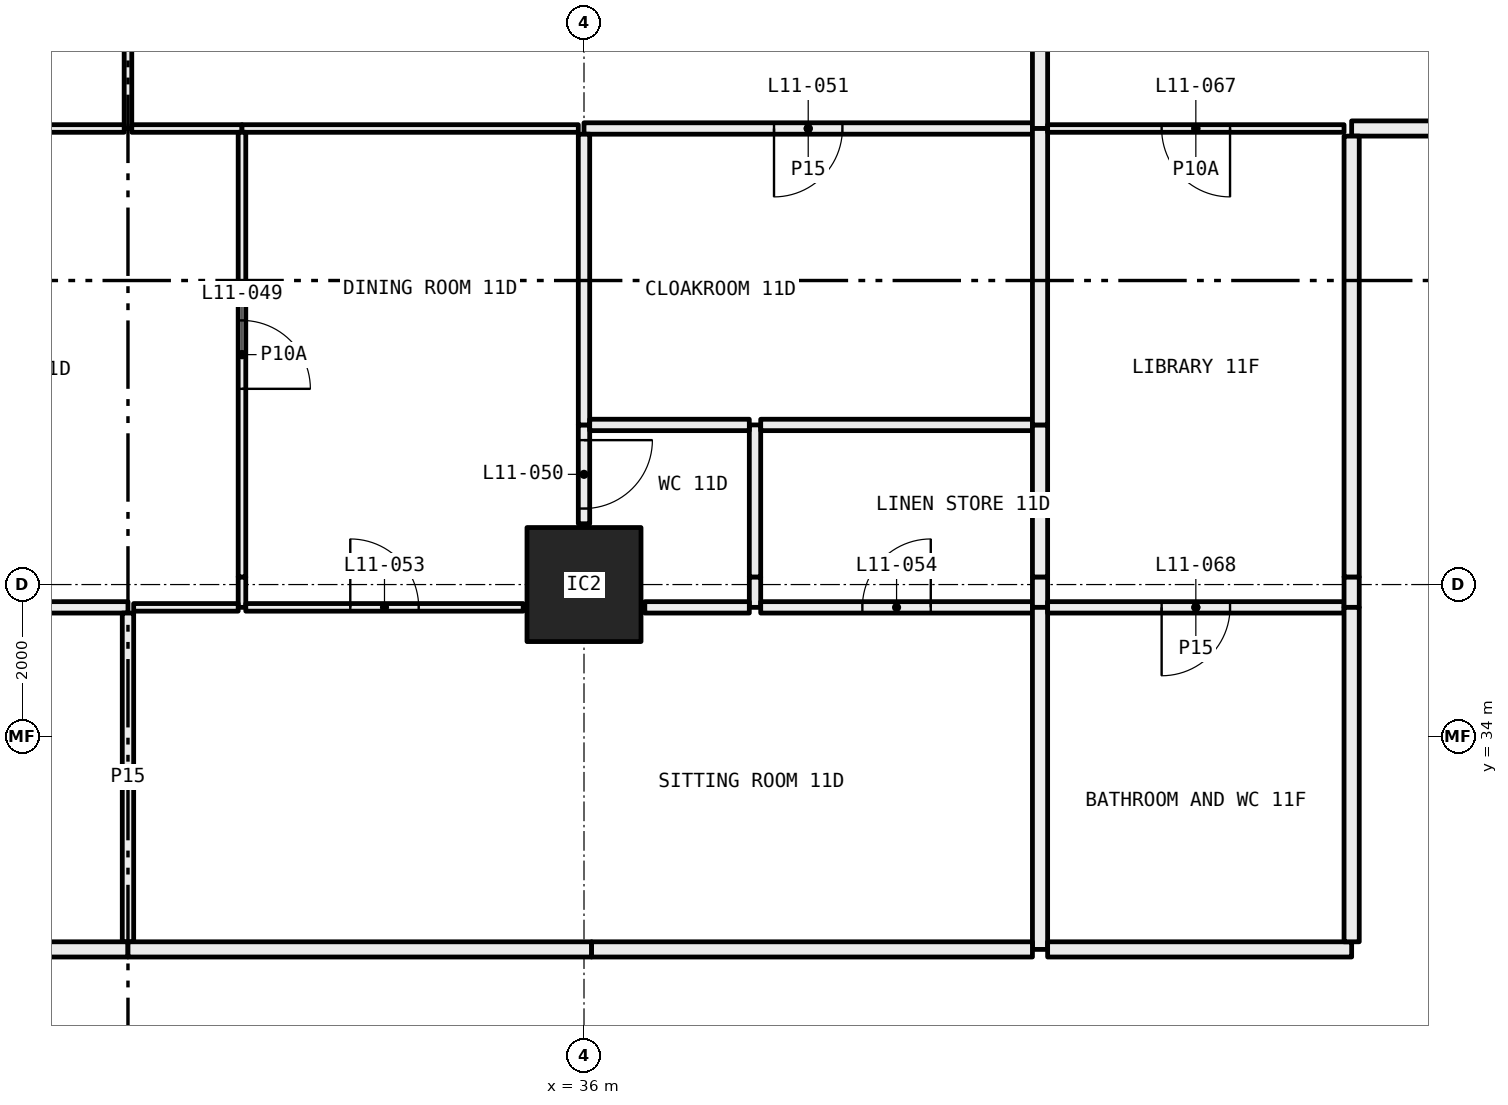
"""IFC4 building model, lengths in metres.
Left out: names, types, materials, properties, quantities, classifications, styles, units other than length and angle.
Written with IfcOpenShell. Run it as: python <this file> out.ifc"""

import sys

from ifc_helpers import new_model, si_unit, direction, frame, frame_2d, origin, origin_2d, place, context, subcontext, project, spatial, rectangle, hollow_rectangle, extrude, element, fill, save


model = new_model("IFC4")
c1 = context("Model", 3, precision=1e-05, world=origin(), true_north=direction((0.0, 1.0)))
c2 = subcontext(c1, "Body", "Model", "MODEL_VIEW")
j1 = project(units=[si_unit("LENGTHUNIT", "METRE"), si_unit("PLANEANGLEUNIT", "RADIAN")], contexts=[c1])
p1 = place(None, origin())
s1 = spatial("IfcSite", under=j1, at=p1, CompositionType="ELEMENT")
p2 = place(p1, origin())
s2 = spatial("IfcBuilding", under=s1, at=p2, CompositionType="ELEMENT")
p3 = place(p2, frame((0.0, 0.0, 50.7)))
s3 = spatial("IfcBuildingStorey", under=s2, at=p3, CompositionType="ELEMENT", Elevation=50.7)
p4 = place(p3, frame((36.0, 36.0, 0.0), z_axis=(0.0, 0.0, 1.0), x_axis=(1.0, 0.0, 0.0)))
e1 = element("IfcColumn", 1, at=p4, inside=s3, PredefinedType="COLUMN", context=c2, shape_type="SweptSolid", body=[
    extrude(hollow_rectangle(XDim=1.5, YDim=1.5, WallThickness=0.065, at=origin_2d()), origin(), (0.0, 0.0, 1.0), 3.05),
])
p5 = place(p3, frame((30.0, 42.0, 0.0), z_axis=(0.0, 0.0, 1.0), x_axis=(0.0, 1.0, 0.0)))
e2 = element("IfcWall", 2, at=p5, inside=s3, PredefinedType="PARTITIONING", context=c2, shape_type="SweptSolid", body=[
    extrude(rectangle(XDim=5.28, YDim=0.1, at=frame_2d((2.64, 0.0))), origin(), (0.0, 0.0, 1.0), 3.05),
])
p6 = place(p5, frame((2.19, 0.0, 0.0)))
e3 = element("IfcOpeningElement", 3, at=p6, cuts=e2, PredefinedType="OPENING", context=c2, shape_type="SweptSolid", body=[
    extrude(rectangle(XDim=0.9, YDim=2.1, at=frame_2d((0.45, 1.05))), frame((0.0, 0.06, 0.0), z_axis=(0.0, -1.0, 0.0), x_axis=(1.0, 0.0, 0.0)), (0.0, 0.0, 1.0), 0.12),
])
p7 = place(p3, frame((26.0, 42.0, 0.0), z_axis=(0.0, 0.0, 1.0), x_axis=(1.0, 0.0, 0.0)))
e4 = element("IfcWall", 4, at=p7, inside=s3, PredefinedType="PARTITIONING", context=c2, shape_type="SweptSolid", body=[
    extrude(rectangle(XDim=3.95, YDim=0.1, at=frame_2d((1.975, 0.0))), origin(), (0.0, 0.0, 1.0), 3.05),
])
p8 = place(p7, frame((1.525, 0.0, 0.0)))
e5 = element("IfcOpeningElement", 5, at=p8, cuts=e4, PredefinedType="OPENING", context=c2, shape_type="SweptSolid", body=[
    extrude(rectangle(XDim=0.9, YDim=2.1, at=frame_2d((0.45, 1.05))), frame((0.0, 0.06, 0.0), z_axis=(0.0, -1.0, 0.0), x_axis=(1.0, 0.0, 0.0)), (0.0, 0.0, 1.0), 0.12),
])
p9 = place(p3, frame((30.05, 42.0, 0.0), z_axis=(0.0, 0.0, 1.0), x_axis=(1.0, 0.0, 0.0)))
e6 = element("IfcWall", 6, at=p9, inside=s3, PredefinedType="PARTITIONING", context=c2, shape_type="SweptSolid", body=[
    extrude(rectangle(XDim=1.45, YDim=0.1, at=frame_2d((0.725, 0.0))), origin(), (0.0, 0.0, 1.0), 3.05),
])
p10 = place(p3, frame((31.5, 42.0, 0.0), z_axis=(0.0, 0.0, 1.0), x_axis=(1.0, 0.0, 0.0)))
e7 = element("IfcWall", 7, at=p10, inside=s3, PredefinedType="PARTITIONING", context=c2, shape_type="SweptSolid", body=[
    extrude(rectangle(XDim=4.425, YDim=0.1, at=frame_2d((2.212, 0.0))), origin(), (0.0, 0.0, 1.0), 2.45),
])
p11 = place(p3, frame((36.0, 42.0, 0.0), z_axis=(0.0, 0.0, 1.0), x_axis=(1.0, 0.0, 0.0)))
e8 = element("IfcWall", 8, at=p11, inside=s3, PredefinedType="PARTITIONING", context=c2, shape_type="SweptSolid", body=[
    extrude(rectangle(XDim=5.9, YDim=0.15, at=frame_2d((2.95, 0.0))), origin(), (0.0, 0.0, 1.0), 2.45),
])
p12 = place(p11, frame((2.5, 0.0, 0.0)))
e9 = element("IfcOpeningElement", 9, at=p12, cuts=e8, PredefinedType="OPENING", context=c2, shape_type="SweptSolid", body=[
    extrude(rectangle(XDim=0.9, YDim=2.1, at=frame_2d((0.45, 1.05))), frame((0.0, 0.085, 0.0), z_axis=(0.0, -1.0, 0.0), x_axis=(1.0, 0.0, 0.0)), (0.0, 0.0, 1.0), 0.17),
])
p13 = place(p3, frame((42.0, 42.0, 0.0), z_axis=(0.0, 0.0, 1.0), x_axis=(0.0, 1.0, 0.0)))
e10 = element("IfcWall", 10, at=p13, inside=s3, PredefinedType="PARTITIONING", context=c2, shape_type="SweptSolid", body=[
    extrude(rectangle(XDim=5.28, YDim=0.2, at=frame_2d((2.64, 0.0))), origin(), (0.0, 0.0, 1.0), 3.05),
])
p14 = place(p3, frame((31.5, 35.7, 0.0), z_axis=(0.0, 0.0, 1.0), x_axis=(0.0, 1.0, 0.0)))
e11 = element("IfcWall", 11, at=p14, inside=s3, PredefinedType="PARTITIONING", context=c2, shape_type="SweptSolid", body=[
    extrude(rectangle(XDim=0.4, YDim=0.1, at=frame_2d((0.2, 0.0))), origin(), (0.0, 0.0, 1.0), 2.45),
])
p15 = place(p3, frame((31.5, 36.1, 0.0), z_axis=(0.0, 0.0, 1.0), x_axis=(0.0, 1.0, 0.0)))
e12 = element("IfcWall", 12, at=p15, inside=s3, PredefinedType="PARTITIONING", context=c2, shape_type="SweptSolid", body=[
    extrude(rectangle(XDim=5.85, YDim=0.1, at=frame_2d((2.925, 0.0))), origin(), (0.0, 0.0, 1.0), 3.05),
])
p16 = place(p15, frame((2.475, 0.0, 0.0)))
e13 = element("IfcOpeningElement", 13, at=p16, cuts=e12, PredefinedType="OPENING", context=c2, shape_type="SweptSolid", body=[
    extrude(rectangle(XDim=0.9, YDim=2.1, at=frame_2d((0.45, 1.05))), frame((0.0, 0.06, 0.0), z_axis=(0.0, -1.0, 0.0), x_axis=(1.0, 0.0, 0.0)), (0.0, 0.0, 1.0), 0.12),
])
p17 = place(p3, frame((26.0, 35.7, 0.0), z_axis=(0.0, 0.0, 1.0), x_axis=(1.0, 0.0, 0.0)))
e14 = element("IfcWall", 14, at=p17, inside=s3, PredefinedType="PARTITIONING", context=c2, shape_type="SweptSolid", body=[
    extrude(rectangle(XDim=4.0, YDim=0.15, at=frame_2d((2.0, 0.0))), origin(), (0.0, 0.0, 1.0), 3.05),
])
p18 = place(p17, frame((1.55, 0.0, 0.0)))
e15 = element("IfcOpeningElement", 15, at=p18, cuts=e14, PredefinedType="OPENING", context=c2, shape_type="SweptSolid", body=[
    extrude(rectangle(XDim=0.9, YDim=2.1, at=frame_2d((0.45, 1.05))), frame((0.0, 0.085, 0.0), z_axis=(0.0, -1.0, 0.0), x_axis=(1.0, 0.0, 0.0)), (0.0, 0.0, 1.0), 0.17),
])
p19 = place(p3, frame((30.075, 35.7, 0.0), z_axis=(0.0, 0.0, 1.0), x_axis=(1.0, 0.0, 0.0)))
e16 = element("IfcWall", 16, at=p19, inside=s3, PredefinedType="PARTITIONING", context=c2, shape_type="SweptSolid", body=[
    extrude(rectangle(XDim=1.375, YDim=0.1, at=frame_2d((0.688, 0.0))), origin(), (0.0, 0.0, 1.0), 3.05),
])
p20 = place(p3, frame((36.0, 36.8, 0.0), z_axis=(0.0, 0.0, 1.0), x_axis=(0.0, 1.0, 0.0)))
e17 = element("IfcWall", 17, at=p20, inside=s3, PredefinedType="PARTITIONING", context=c2, shape_type="SweptSolid", body=[
    extrude(rectangle(XDim=1.3, YDim=0.15, at=frame_2d((0.65, 0.0))), origin(), (0.0, 0.0, 1.0), 2.45),
])
p21 = place(p20, frame((0.2, 0.0, 0.0)))
e18 = element("IfcOpeningElement", 18, at=p21, cuts=e17, PredefinedType="OPENING", context=c2, shape_type="SweptSolid", body=[
    extrude(rectangle(XDim=0.9, YDim=2.1, at=frame_2d((0.45, 1.05))), frame((0.0, 0.085, 0.0), z_axis=(0.0, -1.0, 0.0), x_axis=(1.0, 0.0, 0.0)), (0.0, 0.0, 1.0), 0.17),
])
p22 = place(p3, frame((36.0, 38.1, 0.0), z_axis=(0.0, 0.0, 1.0), x_axis=(0.0, 1.0, 0.0)))
e19 = element("IfcWall", 19, at=p22, inside=s3, PredefinedType="PARTITIONING", context=c2, shape_type="SweptSolid", body=[
    extrude(rectangle(XDim=3.825, YDim=0.15, at=frame_2d((1.913, 0.0))), origin(), (0.0, 0.0, 1.0), 2.45),
])
p23 = place(p3, frame((31.55, 35.7, 0.0), z_axis=(0.0, 0.0, 1.0), x_axis=(1.0, 0.0, 0.0)))
e20 = element("IfcWall", 20, at=p23, inside=s3, PredefinedType="PARTITIONING", context=c2, shape_type="SweptSolid", body=[
    extrude(rectangle(XDim=3.65, YDim=0.1, at=frame_2d((1.825, 0.0))), origin(), (0.0, 0.0, 1.0), 3.05),
])
p24 = place(p23, frame((1.375, 0.0, 0.0)))
e21 = element("IfcOpeningElement", 21, at=p24, cuts=e20, PredefinedType="OPENING", context=c2, shape_type="SweptSolid", body=[
    extrude(rectangle(XDim=0.9, YDim=2.1, at=frame_2d((0.45, 1.05))), frame((0.0, 0.06, 0.0), z_axis=(0.0, -1.0, 0.0), x_axis=(1.0, 0.0, 0.0)), (0.0, 0.0, 1.0), 0.12),
])
p25 = place(p3, frame((38.25, 35.7, 0.0), z_axis=(0.0, 0.0, 1.0), x_axis=(0.0, 1.0, 0.0)))
e22 = element("IfcWall", 22, at=p25, inside=s3, PredefinedType="PARTITIONING", context=c2, shape_type="SweptSolid", body=[
    extrude(rectangle(XDim=0.4, YDim=0.15, at=frame_2d((0.2, 0.0))), origin(), (0.0, 0.0, 1.0), 2.45),
])
p26 = place(p3, frame((38.25, 36.1, 0.0), z_axis=(0.0, 0.0, 1.0), x_axis=(0.0, 1.0, 0.0)))
e23 = element("IfcWall", 23, at=p26, inside=s3, PredefinedType="PARTITIONING", context=c2, shape_type="SweptSolid", body=[
    extrude(rectangle(XDim=2.0, YDim=0.15, at=frame_2d((1.0, 0.0))), origin(), (0.0, 0.0, 1.0), 3.05),
])
p27 = place(p3, frame((38.175, 38.1, 0.0), z_axis=(0.0, 0.0, 1.0), x_axis=(-1.0, 0.0, 0.0)))
e24 = element("IfcWall", 24, at=p27, inside=s3, PredefinedType="PARTITIONING", context=c2, shape_type="SweptSolid", body=[
    extrude(rectangle(XDim=2.1, YDim=0.15, at=frame_2d((1.05, 0.0))), origin(), (0.0, 0.0, 1.0), 2.45),
])
p28 = place(p3, frame((36.8, 35.7, 0.0), z_axis=(0.0, 0.0, 1.0), x_axis=(1.0, 0.0, 0.0)))
e25 = element("IfcWall", 25, at=p28, inside=s3, PredefinedType="PARTITIONING", context=c2, shape_type="SweptSolid", body=[
    extrude(rectangle(XDim=1.375, YDim=0.15, at=frame_2d((0.688, 0.0))), origin(), (0.0, 0.0, 1.0), 3.05),
])
p29 = place(p3, frame((41.9, 38.1, 0.0), z_axis=(0.0, 0.0, 1.0), x_axis=(-1.0, 0.0, 0.0)))
e26 = element("IfcWall", 26, at=p29, inside=s3, PredefinedType="PARTITIONING", context=c2, shape_type="SweptSolid", body=[
    extrude(rectangle(XDim=3.575, YDim=0.15, at=frame_2d((1.788, 0.0))), origin(), (0.0, 0.0, 1.0), 3.05),
])
p30 = place(p3, frame((38.325, 35.7, 0.0), z_axis=(0.0, 0.0, 1.0), x_axis=(1.0, 0.0, 0.0)))
e27 = element("IfcWall", 27, at=p30, inside=s3, PredefinedType="PARTITIONING", context=c2, shape_type="SweptSolid", body=[
    extrude(rectangle(XDim=3.575, YDim=0.15, at=frame_2d((1.788, 0.0))), origin(), (0.0, 0.0, 1.0), 3.05),
])
p31 = place(p30, frame((1.337, 0.0, 0.0)))
e28 = element("IfcOpeningElement", 28, at=p31, cuts=e27, PredefinedType="OPENING", context=c2, shape_type="SweptSolid", body=[
    extrude(rectangle(XDim=0.9, YDim=2.1, at=frame_2d((0.45, 1.05))), frame((0.0, 0.085, 0.0), z_axis=(0.0, -1.0, 0.0), x_axis=(1.0, 0.0, 0.0)), (0.0, 0.0, 1.0), 0.17),
])
p32 = place(p3, frame((42.0, 35.7, 0.0), z_axis=(0.0, 0.0, 1.0), x_axis=(0.0, 1.0, 0.0)))
e29 = element("IfcWall", 29, at=p32, inside=s3, PredefinedType="PARTITIONING", context=c2, shape_type="SweptSolid", body=[
    extrude(rectangle(XDim=0.4, YDim=0.2, at=frame_2d((0.2, 0.0))), origin(), (0.0, 0.0, 1.0), 2.45),
])
p33 = place(p3, frame((42.0, 36.1, 0.0), z_axis=(0.0, 0.0, 1.0), x_axis=(0.0, 1.0, 0.0)))
e30 = element("IfcWall", 30, at=p33, inside=s3, PredefinedType="PARTITIONING", context=c2, shape_type="SweptSolid", body=[
    extrude(rectangle(XDim=2.0, YDim=0.2, at=frame_2d((1.0, 0.0))), origin(), (0.0, 0.0, 1.0), 3.05),
])
p34 = place(p3, frame((42.0, 38.1, 0.0), z_axis=(0.0, 0.0, 1.0), x_axis=(0.0, 1.0, 0.0)))
e31 = element("IfcWall", 31, at=p34, inside=s3, PredefinedType="PARTITIONING", context=c2, shape_type="SweptSolid", body=[
    extrude(rectangle(XDim=3.9, YDim=0.2, at=frame_2d((1.95, 0.0))), origin(), (0.0, 0.0, 1.0), 3.05),
])
p35 = place(p3, frame((30.0, 31.3, 0.0), z_axis=(0.0, 0.0, 1.0), x_axis=(0.0, 1.0, 0.0)))
e32 = element("IfcWall", 32, at=p35, inside=s3, PredefinedType="PARTITIONING", context=c2, shape_type="SweptSolid", body=[
    extrude(rectangle(XDim=4.325, YDim=0.15, at=frame_2d((2.163, 0.0))), origin(), (0.0, 0.0, 1.0), 3.05),
])
p36 = place(p3, frame((26.0, 31.2, 0.0), z_axis=(0.0, 0.0, 1.0), x_axis=(1.0, 0.0, 0.0)))
e33 = element("IfcWall", 33, at=p36, inside=s3, PredefinedType="PARTITIONING", context=c2, shape_type="SweptSolid", body=[
    extrude(rectangle(XDim=4.0, YDim=0.2, at=frame_2d((2.0, 0.0))), origin(), (0.0, 0.0, 1.0), 3.05),
])
p37 = place(p3, frame((42.0, 31.2, 0.0), z_axis=(0.0, 0.0, 1.0), x_axis=(0.0, 1.0, 0.0)))
e34 = element("IfcWall", 34, at=p37, inside=s3, PredefinedType="PARTITIONING", context=c2, shape_type="SweptSolid", body=[
    extrude(rectangle(XDim=4.5, YDim=0.2, at=frame_2d((2.25, 0.0))), origin(), (0.0, 0.0, 1.0), 3.05),
])
p38 = place(p3, frame((30.0, 31.2, 0.0), z_axis=(0.0, 0.0, 1.0), x_axis=(1.0, 0.0, 0.0)))
e35 = element("IfcWall", 35, at=p38, inside=s3, PredefinedType="PARTITIONING", context=c2, shape_type="SweptSolid", body=[
    extrude(rectangle(XDim=6.1, YDim=0.2, at=frame_2d((3.05, 0.0))), origin(), (0.0, 0.0, 1.0), 2.45),
])
p39 = place(p3, frame((36.1, 31.2, 0.0), z_axis=(0.0, 0.0, 1.0), x_axis=(1.0, 0.0, 0.0)))
e36 = element("IfcWall", 36, at=p39, inside=s3, PredefinedType="PARTITIONING", context=c2, shape_type="SweptSolid", body=[
    extrude(rectangle(XDim=5.8, YDim=0.2, at=frame_2d((2.9, 0.0))), origin(), (0.0, 0.0, 1.0), 3.05),
])
p40 = place(p3, frame((42.1, 42.0, 0.0), z_axis=(0.0, 0.0, 1.0), x_axis=(1.0, 0.0, 0.0)))
e37 = element("IfcWall", 37, at=p40, inside=s3, PredefinedType="PARTITIONING", context=c2, shape_type="SweptSolid", body=[
    extrude(rectangle(XDim=3.9, YDim=0.1, at=frame_2d((1.95, 0.0))), origin(), (0.0, 0.0, 1.0), 3.05),
])
p41 = place(p40, frame((1.5, 0.0, 0.0)))
e38 = element("IfcOpeningElement", 38, at=p41, cuts=e37, PredefinedType="OPENING", context=c2, shape_type="SweptSolid", body=[
    extrude(rectangle(XDim=0.9, YDim=2.1, at=frame_2d((0.45, 1.05))), frame((0.0, 0.06, 0.0), z_axis=(0.0, -1.0, 0.0), x_axis=(1.0, 0.0, 0.0)), (0.0, 0.0, 1.0), 0.12),
])
p42 = place(p3, frame((46.1, 42.0, 0.0), z_axis=(0.0, 0.0, 1.0), x_axis=(1.0, 0.0, 0.0)))
e39 = element("IfcWall", 39, at=p42, inside=s3, PredefinedType="PARTITIONING", context=c2, shape_type="SweptSolid", body=[
    extrude(rectangle(XDim=1.9, YDim=0.2, at=frame_2d((0.95, 0.0))), origin(), (0.0, 0.0, 1.0), 3.05),
])
p43 = place(p3, frame((42.1, 35.7, 0.0), z_axis=(0.0, 0.0, 1.0), x_axis=(1.0, 0.0, 0.0)))
e40 = element("IfcWall", 40, at=p43, inside=s3, PredefinedType="PARTITIONING", context=c2, shape_type="SweptSolid", body=[
    extrude(rectangle(XDim=3.9, YDim=0.15, at=frame_2d((1.95, 0.0))), origin(), (0.0, 0.0, 1.0), 3.05),
])
p44 = place(p43, frame((1.5, 0.0, 0.0)))
e41 = element("IfcOpeningElement", 41, at=p44, cuts=e40, PredefinedType="OPENING", context=c2, shape_type="SweptSolid", body=[
    extrude(rectangle(XDim=0.9, YDim=2.1, at=frame_2d((0.45, 1.05))), frame((0.0, 0.085, 0.0), z_axis=(0.0, -1.0, 0.0), x_axis=(1.0, 0.0, 0.0)), (0.0, 0.0, 1.0), 0.17),
])
p45 = place(p3, frame((46.1, 35.7, 0.0), z_axis=(0.0, 0.0, 1.0), x_axis=(0.0, 1.0, 0.0)))
e42 = element("IfcWall", 42, at=p45, inside=s3, PredefinedType="PARTITIONING", context=c2, shape_type="SweptSolid", body=[
    extrude(rectangle(XDim=0.4, YDim=0.2, at=frame_2d((0.2, 0.0))), origin(), (0.0, 0.0, 1.0), 2.45),
])
p46 = place(p3, frame((46.1, 36.1, 0.0), z_axis=(0.0, 0.0, 1.0), x_axis=(0.0, 1.0, 0.0)))
e43 = element("IfcWall", 43, at=p46, inside=s3, PredefinedType="PARTITIONING", context=c2, shape_type="SweptSolid", body=[
    extrude(rectangle(XDim=5.8, YDim=0.2, at=frame_2d((2.9, 0.0))), origin(), (0.0, 0.0, 1.0), 3.05),
])
p47 = place(p3, frame((42.1, 31.2, 0.0), z_axis=(0.0, 0.0, 1.0), x_axis=(1.0, 0.0, 0.0)))
e44 = element("IfcWall", 44, at=p47, inside=s3, PredefinedType="PARTITIONING", context=c2, shape_type="SweptSolid", body=[
    extrude(rectangle(XDim=4.0, YDim=0.2, at=frame_2d((2.0, 0.0))), origin(), (0.0, 0.0, 1.0), 3.05),
])
p48 = place(p3, frame((46.1, 31.3, 0.0), z_axis=(0.0, 0.0, 1.0), x_axis=(0.0, 1.0, 0.0)))
e45 = element("IfcWall", 45, at=p48, inside=s3, PredefinedType="PARTITIONING", context=c2, shape_type="SweptSolid", body=[
    extrude(rectangle(XDim=4.4, YDim=0.2, at=frame_2d((2.2, 0.0))), origin(), (0.0, 0.0, 1.0), 3.05),
])
p49 = place(p16, frame((0.9, 0.0, 0.0), x_axis=(-1.0, 0.0, 0.0)))
e46 = element("IfcDoor", 46, at=p49, inside=s3, OperationType="SINGLE_SWING_LEFT", PredefinedType="DOOR", context=c2, shape_type="SweptSolid", body=[
    extrude(rectangle(XDim=0.9, YDim=2.1, at=frame_2d((0.45, 1.05))), frame((0.0, 0.025, 0.0), z_axis=(0.0, -1.0, 0.0), x_axis=(1.0, 0.0, 0.0)), (0.0, 0.0, 1.0), 0.05),
])
fill(e13, e46)
p50 = place(p21, frame((0.9, 0.0, 0.0), x_axis=(-1.0, 0.0, 0.0)))
e47 = element("IfcDoor", 47, at=p50, inside=s3, OperationType="SINGLE_SWING_RIGHT", PredefinedType="DOOR", context=c2, shape_type="SweptSolid", body=[
    extrude(rectangle(XDim=0.9, YDim=2.1, at=frame_2d((0.45, 1.05))), frame((0.0, 0.025, 0.0), z_axis=(0.0, -1.0, 0.0), x_axis=(1.0, 0.0, 0.0)), (0.0, 0.0, 1.0), 0.05),
])
fill(e18, e47)
p51 = place(p12, frame((0.9, 0.0, 0.0), x_axis=(-1.0, 0.0, 0.0)))
e48 = element("IfcDoor", 48, at=p51, inside=s3, OperationType="SINGLE_SWING_LEFT", PredefinedType="DOOR", context=c2, shape_type="SweptSolid", body=[
    extrude(rectangle(XDim=0.9, YDim=2.1, at=frame_2d((0.45, 1.05))), frame((0.0, 0.025, 0.0), z_axis=(0.0, -1.0, 0.0), x_axis=(1.0, 0.0, 0.0)), (0.0, 0.0, 1.0), 0.05),
])
fill(e9, e48)
p52 = place(p24, origin())
e49 = element("IfcDoor", 49, at=p52, inside=s3, OperationType="SINGLE_SWING_RIGHT", PredefinedType="DOOR", context=c2, shape_type="SweptSolid", body=[
    extrude(rectangle(XDim=0.9, YDim=2.1, at=frame_2d((0.45, 1.05))), frame((0.0, 0.025, 0.0), z_axis=(0.0, -1.0, 0.0), x_axis=(1.0, 0.0, 0.0)), (0.0, 0.0, 1.0), 0.05),
])
fill(e21, e49)
p53 = place(p31, origin())
e50 = element("IfcDoor", 50, at=p53, inside=s3, OperationType="SINGLE_SWING_LEFT", PredefinedType="DOOR", context=c2, shape_type="SweptSolid", body=[
    extrude(rectangle(XDim=0.9, YDim=2.1, at=frame_2d((0.45, 1.05))), frame((0.0, 0.025, 0.0), z_axis=(0.0, -1.0, 0.0), x_axis=(1.0, 0.0, 0.0)), (0.0, 0.0, 1.0), 0.05),
])
fill(e28, e50)
p54 = place(p41, frame((0.9, 0.0, 0.0), x_axis=(-1.0, 0.0, 0.0)))
e51 = element("IfcDoor", 51, at=p54, inside=s3, OperationType="SINGLE_SWING_RIGHT", PredefinedType="DOOR", context=c2, shape_type="SweptSolid", body=[
    extrude(rectangle(XDim=0.9, YDim=2.1, at=frame_2d((0.45, 1.05))), frame((0.0, 0.025, 0.0), z_axis=(0.0, -1.0, 0.0), x_axis=(1.0, 0.0, 0.0)), (0.0, 0.0, 1.0), 0.05),
])
fill(e38, e51)
p55 = place(p44, frame((0.9, 0.0, 0.0), x_axis=(-1.0, 0.0, 0.0)))
e52 = element("IfcDoor", 52, at=p55, inside=s3, OperationType="SINGLE_SWING_LEFT", PredefinedType="DOOR", context=c2, shape_type="SweptSolid", body=[
    extrude(rectangle(XDim=0.9, YDim=2.1, at=frame_2d((0.45, 1.05))), frame((0.0, 0.025, 0.0), z_axis=(0.0, -1.0, 0.0), x_axis=(1.0, 0.0, 0.0)), (0.0, 0.0, 1.0), 0.05),
])
fill(e41, e52)
save(model, sys.argv[1])
